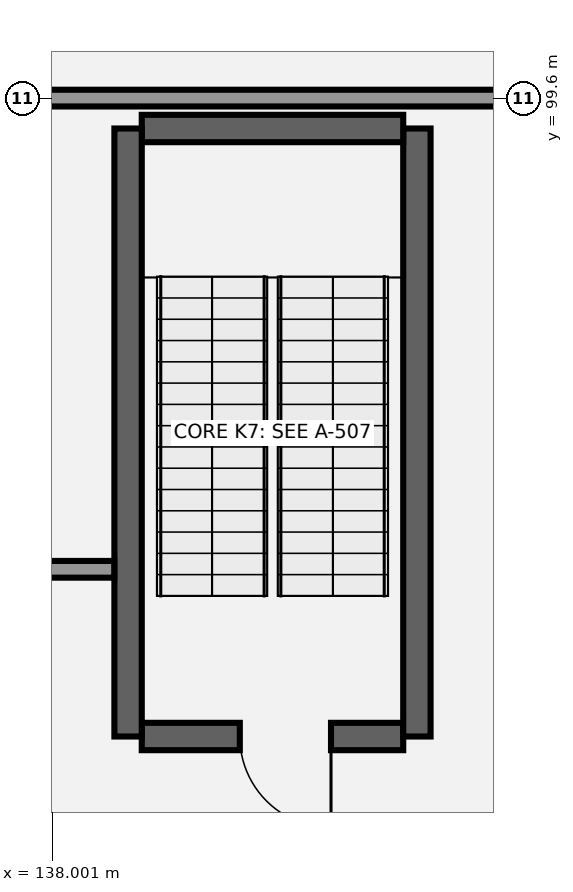
"""IFC4 building model, lengths in metres.
Left out: names, types, materials, properties, quantities, classifications, styles, units other than length and angle.
Written with IfcOpenShell. Run it as: python <this file> out.ifc"""

import sys

from ifc_helpers import new_model, si_unit, direction, frame, frame_2d, origin, place, context, subcontext, project, spatial, rectangle, extrude, element, fill, save


model = new_model("IFC4")
c1 = context("Model", 3, precision=1e-05, world=origin(), true_north=direction((0.0, 1.0)))
c2 = subcontext(c1, "Body", "Model", "MODEL_VIEW")
j1 = project(units=[si_unit("LENGTHUNIT", "METRE"), si_unit("PLANEANGLEUNIT", "RADIAN")], contexts=[c1])
p1 = place(None, origin())
s1 = spatial("IfcSite", under=j1, at=p1, CompositionType="ELEMENT")
p2 = place(p1, origin())
s2 = spatial("IfcBuilding", under=s1, at=p2, CompositionType="ELEMENT")
p3 = place(p2, frame((0.0, 0.0, -4.8)))
s3 = spatial("IfcBuildingStorey", under=s2, at=p3, CompositionType="ELEMENT", Elevation=-4.8)
p4 = place(p3, frame((142.62, 91.2, 0.0), z_axis=(0.0, 0.0, 1.0), x_axis=(-1.0, 0.0, 0.0)))
e1 = element("IfcWall", 1, at=p4, inside=s3, PredefinedType="SHEAR", context=c2, shape_type="SweptSolid", body=[
    extrude(rectangle(XDim=3.44, YDim=0.36, at=frame_2d((1.72, 0.0))), origin(), (0.0, 0.0, 1.0), 4.46),
])
p5 = place(p4, frame((0.95, 0.0, 0.0)))
e2 = element("IfcOpeningElement", 2, at=p5, cuts=e1, PredefinedType="OPENING", context=c2, shape_type="SweptSolid", body=[
    extrude(rectangle(XDim=1.2, YDim=2.2, at=frame_2d((0.6, 1.1))), frame((0.0, 0.19, 0.0), z_axis=(0.0, -1.0, 0.0), x_axis=(1.0, 0.0, 0.0)), (0.0, 0.0, 1.0), 0.38),
])
p6 = place(p3, frame((142.8, 91.2, 0.0), z_axis=(0.0, 0.0, 1.0), x_axis=(0.0, 1.0, 0.0)))
e3 = element("IfcWall", 3, at=p6, inside=s3, PredefinedType="SHEAR", context=c2, shape_type="SweptSolid", body=[
    extrude(rectangle(XDim=8.0, YDim=0.36, at=frame_2d((4.0, 0.0))), origin(), (0.0, 0.0, 1.0), 4.46),
])
p7 = place(p3, frame((142.62, 99.2, 0.0), z_axis=(0.0, 0.0, 1.0), x_axis=(-1.0, 0.0, 0.0)))
e4 = element("IfcWall", 4, at=p7, inside=s3, PredefinedType="SHEAR", context=c2, shape_type="SweptSolid", body=[
    extrude(rectangle(XDim=3.44, YDim=0.36, at=frame_2d((1.72, 0.0))), origin(), (0.0, 0.0, 1.0), 4.46),
])
p8 = place(p3, frame((139.0, 99.2, 0.0), z_axis=(0.0, 0.0, 1.0), x_axis=(0.0, -1.0, 0.0)))
e5 = element("IfcWall", 5, at=p8, inside=s3, PredefinedType="SHEAR", context=c2, shape_type="SweptSolid", body=[
    extrude(rectangle(XDim=8.0, YDim=0.36, at=frame_2d((4.0, 0.0))), origin(), (0.0, 0.0, 1.0), 4.46),
])
p9 = place(p3, frame((77.1, 93.4, 0.0), z_axis=(0.0, 0.0, 1.0), x_axis=(1.0, 0.0, 0.0)))
e6 = element("IfcWall", 6, at=p9, inside=s3, PredefinedType="PARTITIONING", context=c2, shape_type="SweptSolid", body=[
    extrude(rectangle(XDim=61.718, YDim=0.22, at=frame_2d((30.859, 0.0))), origin(), (0.0, 0.0, 1.0), 4.44),
])
p10 = place(p9, frame((5.0, 0.0, 0.0)))
e7 = element("IfcOpeningElement", 7, at=p10, cuts=e6, PredefinedType="OPENING", context=c2, shape_type="SweptSolid", body=[
    extrude(rectangle(XDim=1.1, YDim=2.15, at=frame_2d((0.55, 1.075))), frame((0.0, 0.12, 0.0), z_axis=(0.0, -1.0, 0.0), x_axis=(1.0, 0.0, 0.0)), (0.0, 0.0, 1.0), 0.24),
])
p11 = place(p9, frame((20.0, 0.0, 0.0)))
e8 = element("IfcOpeningElement", 8, at=p11, cuts=e6, PredefinedType="OPENING", context=c2, shape_type="SweptSolid", body=[
    extrude(rectangle(XDim=1.6, YDim=2.2, at=frame_2d((0.8, 1.1))), frame((0.0, 0.12, 0.0), z_axis=(0.0, -1.0, 0.0), x_axis=(1.0, 0.0, 0.0)), (0.0, 0.0, 1.0), 0.24),
])
p12 = place(p9, frame((44.0, 0.0, 0.0)))
e9 = element("IfcOpeningElement", 9, at=p12, cuts=e6, PredefinedType="OPENING", context=c2, shape_type="SweptSolid", body=[
    extrude(rectangle(XDim=1.35, YDim=2.2, at=frame_2d((0.675, 1.1))), frame((0.0, 0.12, 0.0), z_axis=(0.0, -1.0, 0.0), x_axis=(1.0, 0.0, 0.0)), (0.0, 0.0, 1.0), 0.24),
])
p13 = place(p3, frame((77.1, 99.6, 0.0), z_axis=(0.0, 0.0, 1.0), x_axis=(1.0, 0.0, 0.0)))
e10 = element("IfcWall", 10, at=p13, inside=s3, PredefinedType="PARTITIONING", context=c2, shape_type="SweptSolid", body=[
    extrude(rectangle(XDim=71.498, YDim=0.22, at=frame_2d((35.749, 0.0))), origin(), (0.0, 0.0, 1.0), 3.605),
])
p14 = place(p13, frame((14.8, 0.0, 0.0)))
e11 = element("IfcOpeningElement", 11, at=p14, cuts=e10, PredefinedType="OPENING", context=c2, shape_type="SweptSolid", body=[
    extrude(rectangle(XDim=1.7, YDim=2.5, at=frame_2d((0.85, 1.25))), frame((0.0, 0.12, 0.0), z_axis=(0.0, -1.0, 0.0), x_axis=(1.0, 0.0, 0.0)), (0.0, 0.0, 1.0), 0.24),
])
p15 = place(p13, frame((50.8, 0.0, 0.0)))
e12 = element("IfcOpeningElement", 12, at=p15, cuts=e10, PredefinedType="OPENING", context=c2, shape_type="SweptSolid", body=[
    extrude(rectangle(XDim=1.7, YDim=2.5, at=frame_2d((0.85, 1.25))), frame((0.0, 0.12, 0.0), z_axis=(0.0, -1.0, 0.0), x_axis=(1.0, 0.0, 0.0)), (0.0, 0.0, 1.0), 0.24),
])
p16 = place(p5, origin())
e13 = element("IfcDoor", 13, at=p16, inside=s3, OperationType="SINGLE_SWING_LEFT", PredefinedType="DOOR", context=c2, shape_type="SweptSolid", body=[
    extrude(rectangle(XDim=1.2, YDim=2.2, at=frame_2d((0.6, 1.1))), frame((0.0, 0.025, 0.0), z_axis=(0.0, -1.0, 0.0), x_axis=(1.0, 0.0, 0.0)), (0.0, 0.0, 1.0), 0.05),
])
fill(e2, e13)
save(model, sys.argv[1])
